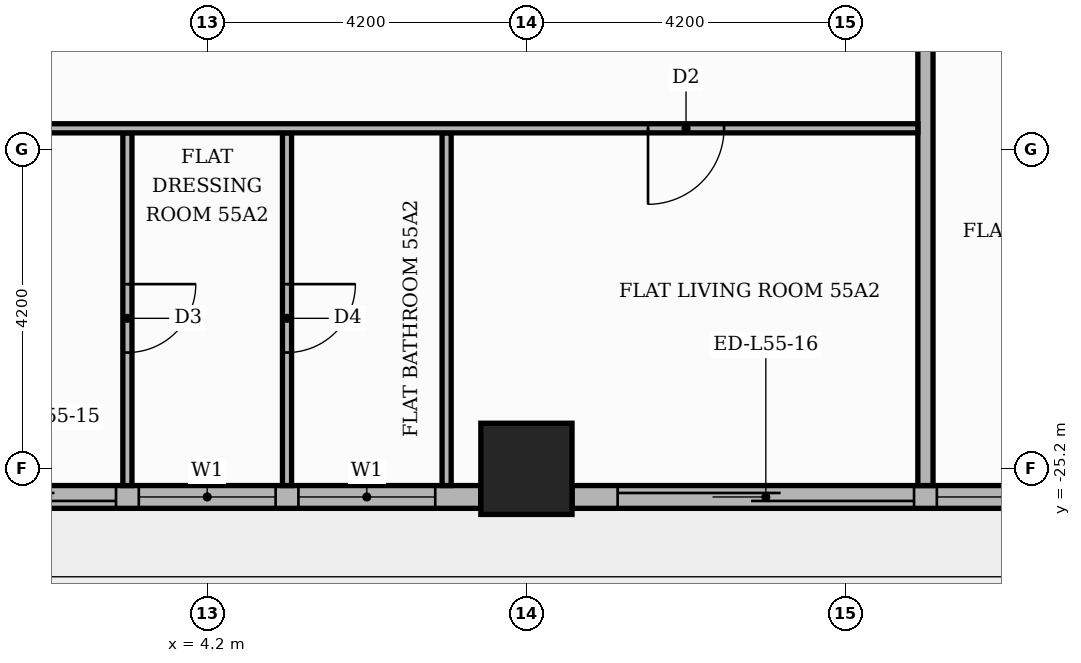
"""IFC4 building model, lengths in metres.
Left out: names, types, materials, properties, quantities, classifications, styles, units other than length and angle.
Written with IfcOpenShell. Run it as: python <this file> out.ifc"""

import sys

from ifc_helpers import new_model, si_unit, direction, frame, frame_2d, origin, origin_2d, place, context, subcontext, project, spatial, rectangle, extrude, element, fill, save


model = new_model("IFC4")
c1 = context("Model", 3, precision=1e-05, world=origin(), true_north=direction((0.0, 1.0)))
c2 = subcontext(c1, "Body", "Model", "MODEL_VIEW")
j1 = project(units=[si_unit("LENGTHUNIT", "METRE"), si_unit("PLANEANGLEUNIT", "RADIAN")], contexts=[c1])
p1 = place(None, origin())
s1 = spatial("IfcSite", under=j1, at=p1, CompositionType="ELEMENT")
p2 = place(p1, origin())
s2 = spatial("IfcBuilding", under=s1, at=p2, CompositionType="ELEMENT")
p3 = place(p2, frame((0.0, 0.0, 231.3)))
s3 = spatial("IfcBuildingStorey", under=s2, at=p3, CompositionType="ELEMENT", Elevation=231.3)
p4 = place(p3, frame((8.4, -25.2, 0.0), z_axis=(0.0, 0.0, 1.0), x_axis=(1.0, 0.0, 0.0)))
e1 = element("IfcColumn", 1, at=p4, inside=s3, PredefinedType="COLUMN", context=c2, shape_type="SweptSolid", body=[
    extrude(rectangle(XDim=1.2, YDim=1.2, at=origin_2d()), origin(), (0.0, 0.0, 1.0), 3.9),
])
p5 = place(p3, frame((0.6, -25.57, 0.0), z_axis=(0.0, 0.0, 1.0), x_axis=(1.0, 0.0, 0.0)))
e2 = element("IfcWall", 2, at=p5, inside=s3, PredefinedType="STANDARD", context=c2, shape_type="SweptSolid", body=[
    extrude(rectangle(XDim=7.2, YDim=0.3, at=frame_2d((3.6, 0.0))), origin(), (0.0, 0.0, 1.0), 3.4),
])
p6 = place(p5, frame((0.6, 0.0, 0.0)))
e3 = element("IfcOpeningElement", 3, at=p6, cuts=e2, PredefinedType="OPENING", context=c2, shape_type="SweptSolid", body=[
    extrude(rectangle(XDim=1.8, YDim=2.4, at=frame_2d((0.9, 1.2))), frame((0.0, 0.16, 0.0), z_axis=(0.0, -1.0, 0.0), x_axis=(1.0, 0.0, 0.0)), (0.0, 0.0, 1.0), 0.32),
])
p7 = place(p5, frame((2.7, 0.0, 0.9)))
e4 = element("IfcOpeningElement", 4, at=p7, cuts=e2, PredefinedType="OPENING", context=c2, shape_type="SweptSolid", body=[
    extrude(rectangle(XDim=1.8, YDim=2.1, at=frame_2d((0.9, 1.05))), frame((0.0, 0.16, 0.0), z_axis=(0.0, -1.0, 0.0), x_axis=(1.0, 0.0, 0.0)), (0.0, 0.0, 1.0), 0.32),
])
p8 = place(p5, frame((4.8, 0.0, 0.9)))
e5 = element("IfcOpeningElement", 5, at=p8, cuts=e2, PredefinedType="OPENING", context=c2, shape_type="SweptSolid", body=[
    extrude(rectangle(XDim=1.8, YDim=2.1, at=frame_2d((0.9, 1.05))), frame((0.0, 0.16, 0.0), z_axis=(0.0, -1.0, 0.0), x_axis=(1.0, 0.0, 0.0)), (0.0, 0.0, 1.0), 0.32),
])
p9 = place(p3, frame((9.0, -25.57, 0.0), z_axis=(0.0, 0.0, 1.0), x_axis=(1.0, 0.0, 0.0)))
e6 = element("IfcWall", 6, at=p9, inside=s3, PredefinedType="STANDARD", context=c2, shape_type="SweptSolid", body=[
    extrude(rectangle(XDim=7.2, YDim=0.3, at=frame_2d((3.6, 0.0))), origin(), (0.0, 0.0, 1.0), 3.4),
])
p10 = place(p9, frame((0.6, 0.0, 0.0)))
e7 = element("IfcOpeningElement", 7, at=p10, cuts=e6, PredefinedType="OPENING", context=c2, shape_type="SweptSolid", body=[
    extrude(rectangle(XDim=3.9, YDim=2.4, at=frame_2d((1.95, 1.2))), frame((0.0, 0.16, 0.0), z_axis=(0.0, -1.0, 0.0), x_axis=(1.0, 0.0, 0.0)), (0.0, 0.0, 1.0), 0.32),
])
p11 = place(p9, frame((4.8, 0.0, 0.9)))
e8 = element("IfcOpeningElement", 8, at=p11, cuts=e6, PredefinedType="OPENING", context=c2, shape_type="SweptSolid", body=[
    extrude(rectangle(XDim=1.8, YDim=2.1, at=frame_2d((0.9, 1.05))), frame((0.0, 0.16, 0.0), z_axis=(0.0, -1.0, 0.0), x_axis=(1.0, 0.0, 0.0)), (0.0, 0.0, 1.0), 0.32),
])
p12 = place(p3, frame((3.15, -25.42, 0.0), z_axis=(0.0, 0.0, 1.0), x_axis=(0.0, 1.0, 0.0)))
e9 = element("IfcWall", 9, at=p12, inside=s3, PredefinedType="PARTITIONING", context=c2, shape_type="SweptSolid", body=[
    extrude(rectangle(XDim=4.64, YDim=0.12, at=frame_2d((2.32, 0.0))), origin(), (0.0, 0.0, 1.0), 3.4),
])
p13 = place(p12, frame((1.75, 0.0, 0.0)))
e10 = element("IfcOpeningElement", 10, at=p13, cuts=e9, PredefinedType="OPENING", context=c2, shape_type="SweptSolid", body=[
    extrude(rectangle(XDim=0.9, YDim=2.1, at=frame_2d((0.45, 1.05))), frame((0.0, 0.07, 0.0), z_axis=(0.0, -1.0, 0.0), x_axis=(1.0, 0.0, 0.0)), (0.0, 0.0, 1.0), 0.14),
])
p14 = place(p3, frame((5.25, -25.42, 0.0), z_axis=(0.0, 0.0, 1.0), x_axis=(0.0, 1.0, 0.0)))
e11 = element("IfcWall", 11, at=p14, inside=s3, PredefinedType="PARTITIONING", context=c2, shape_type="SweptSolid", body=[
    extrude(rectangle(XDim=4.64, YDim=0.12, at=frame_2d((2.32, 0.0))), origin(), (0.0, 0.0, 1.0), 3.4),
])
p15 = place(p14, frame((1.75, 0.0, 0.0)))
e12 = element("IfcOpeningElement", 12, at=p15, cuts=e11, PredefinedType="OPENING", context=c2, shape_type="SweptSolid", body=[
    extrude(rectangle(XDim=0.9, YDim=2.1, at=frame_2d((0.45, 1.05))), frame((0.0, 0.07, 0.0), z_axis=(0.0, -1.0, 0.0), x_axis=(1.0, 0.0, 0.0)), (0.0, 0.0, 1.0), 0.14),
])
p16 = place(p3, frame((7.35, -25.42, 0.0), z_axis=(0.0, 0.0, 1.0), x_axis=(0.0, 1.0, 0.0)))
e13 = element("IfcWall", 13, at=p16, inside=s3, PredefinedType="PARTITIONING", context=c2, shape_type="SweptSolid", body=[
    extrude(rectangle(XDim=4.64, YDim=0.12, at=frame_2d((2.32, 0.0))), origin(), (0.0, 0.0, 1.0), 3.4),
])
p17 = place(p3, frame((13.65, -25.42, 0.0), z_axis=(0.0, 0.0, 1.0), x_axis=(0.0, 1.0, 0.0)))
e14 = element("IfcWall", 14, at=p17, inside=s3, PredefinedType="PARTITIONING", context=c2, shape_type="SweptSolid", body=[
    extrude(rectangle(XDim=11.67, YDim=0.2, at=frame_2d((5.835, 0.0))), origin(), (0.0, 0.0, 1.0), 3.4),
])
p18 = place(p3, frame((-5.15, -20.72, 0.0), z_axis=(0.0, 0.0, 1.0), x_axis=(1.0, 0.0, 0.0)))
e15 = element("IfcWall", 15, at=p18, inside=s3, PredefinedType="PARTITIONING", context=c2, shape_type="SweptSolid", body=[
    extrude(rectangle(XDim=18.7, YDim=0.12, at=frame_2d((9.35, 0.0))), origin(), (0.0, 0.0, 1.0), 3.4),
])
p19 = place(p18, frame((3.65, 0.0, 0.0)))
e16 = element("IfcOpeningElement", 16, at=p19, cuts=e15, PredefinedType="OPENING", context=c2, shape_type="SweptSolid", body=[
    extrude(rectangle(XDim=0.9, YDim=2.1, at=frame_2d((0.45, 1.05))), frame((0.0, 0.07, 0.0), z_axis=(0.0, -1.0, 0.0), x_axis=(1.0, 0.0, 0.0)), (0.0, 0.0, 1.0), 0.14),
])
p20 = place(p18, frame((15.15, 0.0, 0.0)))
e17 = element("IfcOpeningElement", 17, at=p20, cuts=e15, PredefinedType="OPENING", context=c2, shape_type="SweptSolid", body=[
    extrude(rectangle(XDim=1.0, YDim=2.1, at=frame_2d((0.5, 1.05))), frame((0.0, 0.07, 0.0), z_axis=(0.0, -1.0, 0.0), x_axis=(1.0, 0.0, 0.0)), (0.0, 0.0, 1.0), 0.14),
])
p21 = place(p6, origin())
e18 = element("IfcDoor", 18, at=p21, inside=s3, OperationType="SLIDING_TO_LEFT", PredefinedType="DOOR", context=c2, shape_type="SweptSolid", body=[
    extrude(rectangle(XDim=1.8, YDim=2.4, at=frame_2d((0.9, 1.2))), frame((0.0, 0.025, 0.0), z_axis=(0.0, -1.0, 0.0), x_axis=(1.0, 0.0, 0.0)), (0.0, 0.0, 1.0), 0.05),
])
fill(e3, e18)
p22 = place(p7, origin())
e19 = element("IfcWindow", 19, at=p22, inside=s3, PartitioningType="SINGLE_PANEL", PredefinedType="WINDOW", context=c2, shape_type="SweptSolid", body=[
    extrude(rectangle(XDim=1.8, YDim=2.1, at=frame_2d((0.9, 1.05))), frame((0.0, 0.03, 0.0), z_axis=(0.0, -1.0, 0.0), x_axis=(1.0, 0.0, 0.0)), (0.0, 0.0, 1.0), 0.06),
])
fill(e4, e19)
p23 = place(p8, origin())
e20 = element("IfcWindow", 20, at=p23, inside=s3, PartitioningType="SINGLE_PANEL", PredefinedType="WINDOW", context=c2, shape_type="SweptSolid", body=[
    extrude(rectangle(XDim=1.8, YDim=2.1, at=frame_2d((0.9, 1.05))), frame((0.0, 0.03, 0.0), z_axis=(0.0, -1.0, 0.0), x_axis=(1.0, 0.0, 0.0)), (0.0, 0.0, 1.0), 0.06),
])
fill(e5, e20)
p24 = place(p10, origin())
e21 = element("IfcDoor", 21, at=p24, inside=s3, OperationType="SLIDING_TO_LEFT", PredefinedType="DOOR", context=c2, shape_type="SweptSolid", body=[
    extrude(rectangle(XDim=3.9, YDim=2.4, at=frame_2d((1.95, 1.2))), frame((0.0, 0.025, 0.0), z_axis=(0.0, -1.0, 0.0), x_axis=(1.0, 0.0, 0.0)), (0.0, 0.0, 1.0), 0.05),
])
fill(e7, e21)
p25 = place(p11, origin())
e22 = element("IfcWindow", 22, at=p25, inside=s3, PartitioningType="SINGLE_PANEL", PredefinedType="WINDOW", context=c2, shape_type="SweptSolid", body=[
    extrude(rectangle(XDim=1.8, YDim=2.1, at=frame_2d((0.9, 1.05))), frame((0.0, 0.03, 0.0), z_axis=(0.0, -1.0, 0.0), x_axis=(1.0, 0.0, 0.0)), (0.0, 0.0, 1.0), 0.06),
])
fill(e8, e22)
p26 = place(p13, frame((0.9, 0.0, 0.0), z_axis=(0.0, 0.0, 1.0), x_axis=(-1.0, 0.0, 0.0)))
e23 = element("IfcDoor", 23, at=p26, inside=s3, OperationType="SINGLE_SWING_RIGHT", PredefinedType="DOOR", context=c2, shape_type="SweptSolid", body=[
    extrude(rectangle(XDim=0.9, YDim=2.1, at=frame_2d((0.45, 1.05))), frame((0.0, 0.025, 0.0), z_axis=(0.0, -1.0, 0.0), x_axis=(1.0, 0.0, 0.0)), (0.0, 0.0, 1.0), 0.05),
])
fill(e10, e23)
p27 = place(p15, frame((0.9, 0.0, 0.0), z_axis=(0.0, 0.0, 1.0), x_axis=(-1.0, 0.0, 0.0)))
e24 = element("IfcDoor", 24, at=p27, inside=s3, OperationType="SINGLE_SWING_RIGHT", PredefinedType="DOOR", context=c2, shape_type="SweptSolid", body=[
    extrude(rectangle(XDim=0.9, YDim=2.1, at=frame_2d((0.45, 1.05))), frame((0.0, 0.025, 0.0), z_axis=(0.0, -1.0, 0.0), x_axis=(1.0, 0.0, 0.0)), (0.0, 0.0, 1.0), 0.05),
])
fill(e12, e24)
p28 = place(p20, frame((1.0, 0.0, 0.0), z_axis=(0.0, 0.0, 1.0), x_axis=(-1.0, 0.0, 0.0)))
e25 = element("IfcDoor", 25, at=p28, inside=s3, OperationType="SINGLE_SWING_LEFT", PredefinedType="DOOR", context=c2, shape_type="SweptSolid", body=[
    extrude(rectangle(XDim=1.0, YDim=2.1, at=frame_2d((0.5, 1.05))), frame((0.0, 0.025, 0.0), z_axis=(0.0, -1.0, 0.0), x_axis=(1.0, 0.0, 0.0)), (0.0, 0.0, 1.0), 0.05),
])
fill(e17, e25)
save(model, sys.argv[1])
